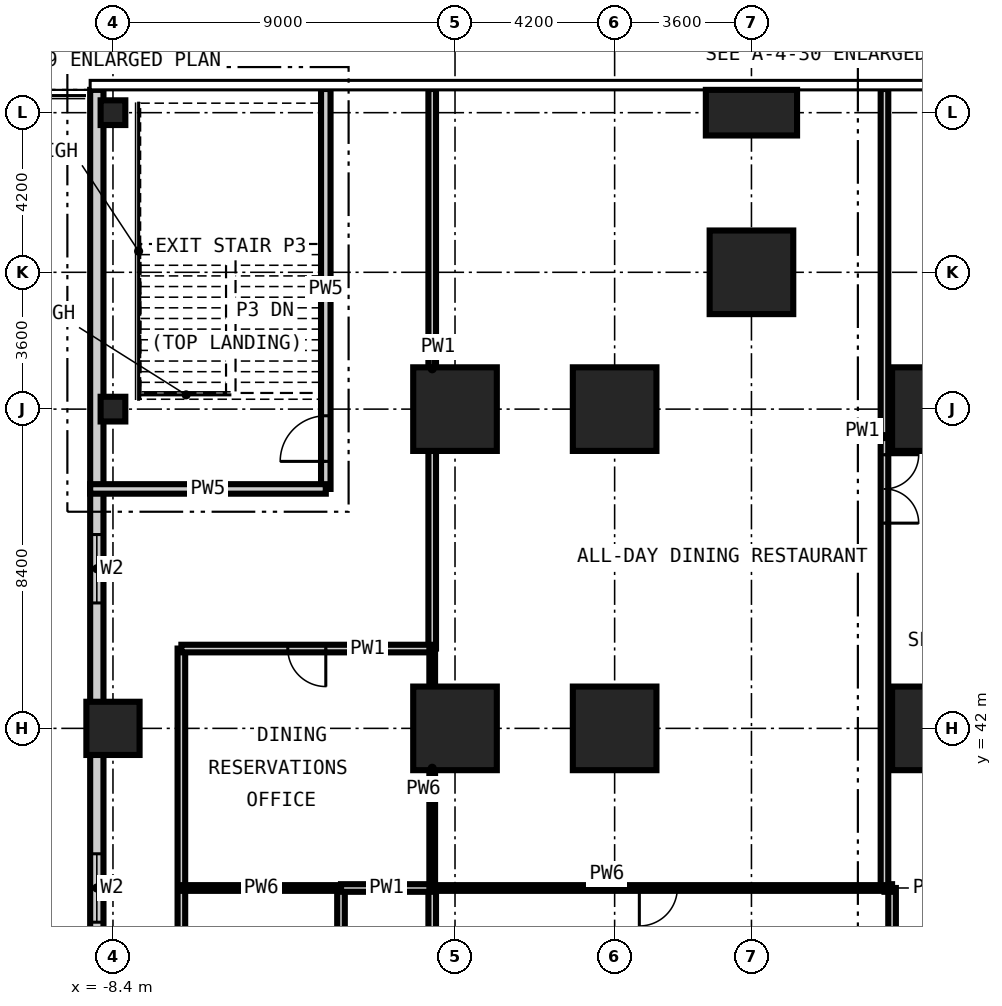
"""IFC4 building model, lengths in metres.
Left out: names, types, materials, properties, quantities, classifications, styles, units other than length and angle.
Written with IfcOpenShell. Run it as: python <this file> out.ifc"""

import sys

from ifc_helpers import new_model, si_unit, direction, frame, frame_2d, origin, origin_2d, place, context, subcontext, project, spatial, rectangle, extrude, element, fill, save


model = new_model("IFC4")
c1 = context("Model", 3, precision=1e-05, world=origin(), true_north=direction((0.0, 1.0)))
c2 = subcontext(c1, "Body", "Model", "MODEL_VIEW")
j1 = project(units=[si_unit("LENGTHUNIT", "METRE"), si_unit("PLANEANGLEUNIT", "RADIAN")], contexts=[c1])
p1 = place(None, origin())
s1 = spatial("IfcSite", under=j1, at=p1, CompositionType="ELEMENT")
p2 = place(p1, origin())
s2 = spatial("IfcBuilding", under=s1, at=p2, CompositionType="ELEMENT")
p3 = place(p2, frame((0.0, 0.0, 17.0)))
s3 = spatial("IfcBuildingStorey", under=s2, at=p3, CompositionType="ELEMENT", Elevation=17.0)
for number, where, z_axis, x_axis in (
    (1, (0.6, 42.0, -0.3), (0.0, 0.0, 1.0), (1.0, 0.0, 0.0)),
    (2, (0.6, 50.4, -0.3), (0.0, 0.0, 1.0), (1.0, 0.0, 0.0)),
    (3, (4.8, 42.0, -0.3), (0.0, 0.0, 1.0), (1.0, 0.0, 0.0)),
    (4, (4.8, 50.4, -0.3), (0.0, 0.0, 1.0), (1.0, 0.0, 0.0)),
    (5, (8.4, 54.0, -0.3), (0.0, 0.0, 1.0), (1.0, 0.0, 0.0)),
):
    element("IfcColumn", number, at=place(p3, frame(where, z_axis=z_axis, x_axis=x_axis)), inside=s3, PredefinedType="COLUMN", context=c2, shape_type="SweptSolid", body=[
        extrude(rectangle(XDim=2.2, YDim=2.2, at=origin_2d()), origin(), (0.0, 0.0, 1.0), 4.95),
    ])
p4 = place(p3, frame((8.4, 58.2, -0.3), z_axis=(0.0, 0.0, 1.0), x_axis=(1.0, 0.0, 0.0)))
e6 = element("IfcColumn", 6, at=p4, inside=s3, PredefinedType="COLUMN", context=c2, shape_type="SweptSolid", body=[
    extrude(rectangle(XDim=2.4, YDim=1.2, at=origin_2d()), origin(), (0.0, 0.0, 1.0), 4.95),
])
for number, where, z_axis, x_axis in (
    (7, (13.2, 42.0, -0.3), (0.0, 0.0, 1.0), (1.0, 0.0, 0.0)),
    (8, (13.2, 50.4, -0.3), (0.0, 0.0, 1.0), (1.0, 0.0, 0.0)),
):
    element("IfcColumn", number, at=place(p3, frame(where, z_axis=z_axis, x_axis=x_axis)), inside=s3, PredefinedType="COLUMN", context=c2, shape_type="SweptSolid", body=[
        extrude(rectangle(XDim=2.2, YDim=2.2, at=origin_2d()), origin(), (0.0, 0.0, 1.0), 4.95),
    ])
p5 = place(p3, frame((-8.4, 42.0, -0.3), z_axis=(0.0, 0.0, 1.0), x_axis=(1.0, 0.0, 0.0)))
e9 = element("IfcColumn", 9, at=p5, inside=s3, PredefinedType="COLUMN", context=c2, shape_type="SweptSolid", body=[
    extrude(rectangle(XDim=1.4, YDim=1.4, at=origin_2d()), origin(), (0.0, 0.0, 1.0), 4.95),
])
for number, where, z_axis, x_axis in (
    (10, (-8.4, 50.4, -0.3), (0.0, 0.0, 1.0), (1.0, 0.0, 0.0)),
    (11, (-8.4, 58.2, -0.3), (0.0, 0.0, 1.0), (1.0, 0.0, 0.0)),
):
    element("IfcColumn", number, at=place(p3, frame(where, z_axis=z_axis, x_axis=x_axis)), inside=s3, PredefinedType="COLUMN", context=c2, shape_type="SweptSolid", body=[
        extrude(rectangle(XDim=0.65, YDim=0.65, at=origin_2d()), origin(), (0.0, 0.0, 1.0), 4.95),
    ])
p6 = place(p3, frame((-8.825, 58.8, 0.0), z_axis=(0.0, 0.0, 1.0), x_axis=(0.0, -1.0, 0.0)))
e12 = element("IfcWall", 12, at=p6, inside=s3, PredefinedType="SOLIDWALL", context=c2, shape_type="SweptSolid", body=[
    extrude(rectangle(XDim=58.8, YDim=0.35, at=frame_2d((29.4, 0.0))), origin(), (0.0, 0.0, 1.0), 4.65),
])
p7 = place(p6, frame((28.9, 0.0, 0.0)))
e13 = element("IfcOpeningElement", 13, at=p7, cuts=e12, PredefinedType="OPENING", context=c2, shape_type="SweptSolid", body=[
    extrude(rectangle(XDim=1.0, YDim=2.4, at=frame_2d((0.5, 1.2))), frame((0.0, 0.185, 0.0), z_axis=(0.0, -1.0, 0.0), x_axis=(1.0, 0.0, 0.0)), (0.0, 0.0, 1.0), 0.37),
])
p8 = place(p6, frame((45.3, 0.0, 0.6)))
e14 = element("IfcOpeningElement", 14, at=p8, cuts=e12, PredefinedType="OPENING", context=c2, shape_type="SweptSolid", body=[
    extrude(rectangle(XDim=1.8, YDim=2.1, at=frame_2d((0.9, 1.05))), frame((0.0, 0.185, 0.0), z_axis=(0.0, -1.0, 0.0), x_axis=(1.0, 0.0, 0.0)), (0.0, 0.0, 1.0), 0.37),
])
p9 = place(p6, frame((36.9, 0.0, 0.6)))
e15 = element("IfcOpeningElement", 15, at=p9, cuts=e12, PredefinedType="OPENING", context=c2, shape_type="SweptSolid", body=[
    extrude(rectangle(XDim=1.8, YDim=2.1, at=frame_2d((0.9, 1.05))), frame((0.0, 0.185, 0.0), z_axis=(0.0, -1.0, 0.0), x_axis=(1.0, 0.0, 0.0)), (0.0, 0.0, 1.0), 0.37),
])
p10 = place(p6, frame((20.1, 0.0, 0.6)))
e16 = element("IfcOpeningElement", 16, at=p10, cuts=e12, PredefinedType="OPENING", context=c2, shape_type="SweptSolid", body=[
    extrude(rectangle(XDim=1.8, YDim=2.1, at=frame_2d((0.9, 1.05))), frame((0.0, 0.185, 0.0), z_axis=(0.0, -1.0, 0.0), x_axis=(1.0, 0.0, 0.0)), (0.0, 0.0, 1.0), 0.37),
])
p11 = place(p6, frame((11.7, 0.0, 0.6)))
e17 = element("IfcOpeningElement", 17, at=p11, cuts=e12, PredefinedType="OPENING", context=c2, shape_type="SweptSolid", body=[
    extrude(rectangle(XDim=1.8, YDim=2.1, at=frame_2d((0.9, 1.05))), frame((0.0, 0.185, 0.0), z_axis=(0.0, -1.0, 0.0), x_axis=(1.0, 0.0, 0.0)), (0.0, 0.0, 1.0), 0.37),
])
p12 = place(p3, frame((-6.6, 14.7, 0.0), z_axis=(0.0, 0.0, 1.0), x_axis=(0.0, 1.0, 0.0)))
e18 = element("IfcWall", 18, at=p12, inside=s3, PredefinedType="PARTITIONING", context=c2, shape_type="SweptSolid", body=[
    extrude(rectangle(XDim=29.4, YDim=0.2, at=frame_2d((14.7, 0.0))), origin(), (0.0, 0.0, 1.0), 4.65),
])
p13 = place(p3, frame((-2.4, 14.7, 0.0), z_axis=(0.0, 0.0, 1.0), x_axis=(0.0, 1.0, 0.0)))
e19 = element("IfcWall", 19, at=p13, inside=s3, PredefinedType="PARTITIONING", context=c2, shape_type="SweptSolid", body=[
    extrude(rectangle(XDim=23.1, YDim=0.2, at=frame_2d((11.55, 0.0))), origin(), (0.0, 0.0, 1.0), 4.65),
])
p14 = place(p13, frame((5.275, 0.0, 0.0)))
e20 = element("IfcOpeningElement", 20, at=p14, cuts=e19, PredefinedType="OPENING", context=c2, shape_type="SweptSolid", body=[
    extrude(rectangle(XDim=1.0, YDim=2.1, at=frame_2d((0.5, 1.05))), frame((0.0, 0.11, 0.0), z_axis=(0.0, -1.0, 0.0), x_axis=(1.0, 0.0, 0.0)), (0.0, 0.0, 1.0), 0.22),
])
p15 = place(p13, frame((16.825, 0.0, 0.0)))
e21 = element("IfcOpeningElement", 21, at=p15, cuts=e19, PredefinedType="OPENING", context=c2, shape_type="SweptSolid", body=[
    extrude(rectangle(XDim=1.0, YDim=2.1, at=frame_2d((0.5, 1.05))), frame((0.0, 0.11, 0.0), z_axis=(0.0, -1.0, 0.0), x_axis=(1.0, 0.0, 0.0)), (0.0, 0.0, 1.0), 0.22),
])
p16 = place(p3, frame((0.0, 14.7, 0.0), z_axis=(0.0, 0.0, 1.0), x_axis=(0.0, 1.0, 0.0)))
e22 = element("IfcWall", 22, at=p16, inside=s3, PredefinedType="PARTITIONING", context=c2, shape_type="SweptSolid", body=[
    extrude(rectangle(XDim=23.1, YDim=0.2, at=frame_2d((11.55, 0.0))), origin(), (0.0, 0.0, 1.0), 4.65),
])
p17 = place(p16, frame((14.2, 0.0, 0.0)))
e23 = element("IfcOpeningElement", 23, at=p17, cuts=e22, PredefinedType="OPENING", context=c2, shape_type="SweptSolid", body=[
    extrude(rectangle(XDim=1.0, YDim=2.1, at=frame_2d((0.5, 1.05))), frame((0.0, 0.11, 0.0), z_axis=(0.0, -1.0, 0.0), x_axis=(1.0, 0.0, 0.0)), (0.0, 0.0, 1.0), 0.22),
])
p18 = place(p16, frame((3.35, 0.0, 0.0)))
e24 = element("IfcOpeningElement", 24, at=p18, cuts=e22, PredefinedType="OPENING", context=c2, shape_type="SweptSolid", body=[
    extrude(rectangle(XDim=1.0, YDim=2.1, at=frame_2d((0.5, 1.05))), frame((0.0, 0.11, 0.0), z_axis=(0.0, -1.0, 0.0), x_axis=(1.0, 0.0, 0.0)), (0.0, 0.0, 1.0), 0.22),
])
p19 = place(p3, frame((0.0, 44.1, 0.0), z_axis=(0.0, 0.0, 1.0), x_axis=(0.0, 1.0, 0.0)))
e25 = element("IfcWall", 25, at=p19, inside=s3, PredefinedType="PARTITIONING", context=c2, shape_type="SweptSolid", body=[
    extrude(rectangle(XDim=14.723, YDim=0.2, at=frame_2d((7.361, 0.0))), origin(), (0.0, 0.0, 1.0), 4.65),
])
p20 = place(p3, frame((12.1, 14.7, 0.0), z_axis=(0.0, 0.0, 1.0), x_axis=(0.0, 1.0, 0.0)))
e26 = element("IfcWall", 26, at=p20, inside=s3, PredefinedType="PARTITIONING", context=c2, shape_type="SweptSolid", body=[
    extrude(rectangle(XDim=23.1, YDim=0.2, at=frame_2d((11.55, 0.0))), origin(), (0.0, 0.0, 1.0), 4.65),
])
p21 = place(p3, frame((-2.4, 37.8, 0.0), z_axis=(0.0, 0.0, 1.0), x_axis=(1.0, 0.0, 0.0)))
e27 = element("IfcWall", 27, at=p21, inside=s3, PredefinedType="PARTITIONING", context=c2, shape_type="SweptSolid", body=[
    extrude(rectangle(XDim=2.4, YDim=0.2, at=frame_2d((1.2, 0.0))), origin(), (0.0, 0.0, 1.0), 4.65),
])
p22 = place(p3, frame((11.9, 37.8, 0.0), z_axis=(0.0, 0.0, 1.0), x_axis=(1.0, 0.0, 0.0)))
e28 = element("IfcWall", 28, at=p22, inside=s3, PredefinedType="PARTITIONING", context=c2, shape_type="SweptSolid", body=[
    extrude(rectangle(XDim=0.2, YDim=0.2, at=frame_2d((0.1, 0.0))), origin(), (0.0, 0.0, 1.0), 4.65),
])
p23 = place(p3, frame((-6.6, 44.1, 0.0), z_axis=(0.0, 0.0, 1.0), x_axis=(1.0, 0.0, 0.0)))
e29 = element("IfcWall", 29, at=p23, inside=s3, PredefinedType="PARTITIONING", context=c2, shape_type="SweptSolid", body=[
    extrude(rectangle(XDim=6.6, YDim=0.2, at=frame_2d((3.3, 0.0))), origin(), (0.0, 0.0, 1.0), 4.65),
])
p24 = place(p23, frame((2.8, 0.0, 0.0)))
e30 = element("IfcOpeningElement", 30, at=p24, cuts=e29, PredefinedType="OPENING", context=c2, shape_type="SweptSolid", body=[
    extrude(rectangle(XDim=1.0, YDim=2.1, at=frame_2d((0.5, 1.05))), frame((0.0, 0.11, 0.0), z_axis=(0.0, -1.0, 0.0), x_axis=(1.0, 0.0, 0.0)), (0.0, 0.0, 1.0), 0.22),
])
p25 = place(p3, frame((11.9, 58.823, 0.0), z_axis=(0.0, 0.0, 1.0), x_axis=(0.0, -1.0, 0.0)))
e31 = element("IfcWall", 31, at=p25, inside=s3, PredefinedType="PARTITIONING", context=c2, shape_type="SweptSolid", body=[
    extrude(rectangle(XDim=21.023, YDim=0.2, at=frame_2d((10.511, 0.0))), origin(), (0.0, 0.0, 1.0), 4.65),
])
p26 = place(p25, frame((9.623, 0.0, 0.0)))
e32 = element("IfcOpeningElement", 32, at=p26, cuts=e31, PredefinedType="OPENING", context=c2, shape_type="SweptSolid", body=[
    extrude(rectangle(XDim=1.8, YDim=2.4, at=frame_2d((0.9, 1.2))), frame((0.0, 0.11, 0.0), z_axis=(0.0, -1.0, 0.0), x_axis=(1.0, 0.0, 0.0)), (0.0, 0.0, 1.0), 0.22),
])
p27 = place(p3, frame((0.0, 37.8, 0.0), z_axis=(0.0, 0.0, 1.0), x_axis=(0.0, 1.0, 0.0)))
e33 = element("IfcWall", 33, at=p27, inside=s3, PredefinedType="PARTITIONING", context=c2, shape_type="SweptSolid", body=[
    extrude(rectangle(XDim=6.3, YDim=0.15, at=frame_2d((3.15, 0.0))), origin(), (0.0, 0.0, 1.0), 4.65),
])
p28 = place(p3, frame((-6.6, 37.8, 0.0), z_axis=(0.0, 0.0, 1.0), x_axis=(1.0, 0.0, 0.0)))
e34 = element("IfcWall", 34, at=p28, inside=s3, PredefinedType="PARTITIONING", context=c2, shape_type="SweptSolid", body=[
    extrude(rectangle(XDim=4.2, YDim=0.15, at=frame_2d((2.1, 0.0))), origin(), (0.0, 0.0, 1.0), 4.65),
])
p29 = place(p3, frame((0.0, 37.8, 0.0), z_axis=(0.0, 0.0, 1.0), x_axis=(1.0, 0.0, 0.0)))
e35 = element("IfcWall", 35, at=p29, inside=s3, PredefinedType="PARTITIONING", context=c2, shape_type="SweptSolid", body=[
    extrude(rectangle(XDim=11.9, YDim=0.15, at=frame_2d((5.95, 0.0))), origin(), (0.0, 0.0, 1.0), 4.65),
])
p30 = place(p29, frame((5.45, 0.0, 0.0)))
e36 = element("IfcOpeningElement", 36, at=p30, cuts=e35, PredefinedType="OPENING", context=c2, shape_type="SweptSolid", body=[
    extrude(rectangle(XDim=1.0, YDim=2.1, at=frame_2d((0.5, 1.05))), frame((0.0, 0.085, 0.0), z_axis=(0.0, -1.0, 0.0), x_axis=(1.0, 0.0, 0.0)), (0.0, 0.0, 1.0), 0.17),
])
p31 = place(p3, frame((-2.8, 48.3, 0.0), z_axis=(0.0, 0.0, 1.0), x_axis=(0.0, 1.0, 0.0)))
e37 = element("IfcWall", 37, at=p31, inside=s3, PredefinedType="PARTITIONING", context=c2, shape_type="SweptSolid", body=[
    extrude(rectangle(XDim=10.523, YDim=0.25, at=frame_2d((5.261, 0.0))), origin(), (0.0, 0.0, 1.0), 4.65),
])
p32 = place(p31, frame((0.725, 0.0, 0.0)))
e38 = element("IfcOpeningElement", 38, at=p32, cuts=e37, PredefinedType="OPENING", context=c2, shape_type="SweptSolid", body=[
    extrude(rectangle(XDim=1.2, YDim=2.2, at=frame_2d((0.6, 1.1))), frame((0.0, 0.135, 0.0), z_axis=(0.0, -1.0, 0.0), x_axis=(1.0, 0.0, 0.0)), (0.0, 0.0, 1.0), 0.27),
])
p33 = place(p3, frame((-9.0, 48.3, 0.0), z_axis=(0.0, 0.0, 1.0), x_axis=(1.0, 0.0, 0.0)))
e39 = element("IfcWall", 39, at=p33, inside=s3, PredefinedType="PARTITIONING", context=c2, shape_type="SweptSolid", body=[
    extrude(rectangle(XDim=6.2, YDim=0.25, at=frame_2d((3.1, 0.0))), origin(), (0.0, 0.0, 1.0), 4.65),
])
p34 = place(p10, origin())
e40 = element("IfcWindow", 40, at=p34, inside=s3, PartitioningType="SINGLE_PANEL", PredefinedType="WINDOW", context=c2, shape_type="SweptSolid", body=[
    extrude(rectangle(XDim=1.8, YDim=2.1, at=frame_2d((0.9, 1.05))), frame((0.0, 0.03, 0.0), z_axis=(0.0, -1.0, 0.0), x_axis=(1.0, 0.0, 0.0)), (0.0, 0.0, 1.0), 0.06),
])
fill(e16, e40)
p35 = place(p11, origin())
e41 = element("IfcWindow", 41, at=p35, inside=s3, PartitioningType="SINGLE_PANEL", PredefinedType="WINDOW", context=c2, shape_type="SweptSolid", body=[
    extrude(rectangle(XDim=1.8, YDim=2.1, at=frame_2d((0.9, 1.05))), frame((0.0, 0.03, 0.0), z_axis=(0.0, -1.0, 0.0), x_axis=(1.0, 0.0, 0.0)), (0.0, 0.0, 1.0), 0.06),
])
fill(e17, e41)
p36 = place(p32, origin())
e42 = element("IfcDoor", 42, at=p36, inside=s3, OperationType="SINGLE_SWING_LEFT", PredefinedType="DOOR", context=c2, shape_type="SweptSolid", body=[
    extrude(rectangle(XDim=1.2, YDim=2.2, at=frame_2d((0.6, 1.1))), frame((0.0, 0.025, 0.0), z_axis=(0.0, -1.0, 0.0), x_axis=(1.0, 0.0, 0.0)), (0.0, 0.0, 1.0), 0.05),
])
fill(e38, e42)
p37 = place(p26, origin())
e43 = element("IfcDoor", 43, at=p37, inside=s3, OperationType="DOUBLE_DOOR_DOUBLE_SWING", PredefinedType="DOOR", context=c2, shape_type="SweptSolid", body=[
    extrude(rectangle(XDim=1.8, YDim=2.4, at=frame_2d((0.9, 1.2))), frame((0.0, 0.025, 0.0), z_axis=(0.0, -1.0, 0.0), x_axis=(1.0, 0.0, 0.0)), (0.0, 0.0, 1.0), 0.05),
])
fill(e32, e43)
p38 = place(p30, frame((1.0, 0.0, 0.0), z_axis=(0.0, 0.0, 1.0), x_axis=(-1.0, 0.0, 0.0)))
e44 = element("IfcDoor", 44, at=p38, inside=s3, OperationType="SINGLE_SWING_RIGHT", PredefinedType="DOOR", context=c2, shape_type="SweptSolid", body=[
    extrude(rectangle(XDim=1.0, YDim=2.1, at=frame_2d((0.5, 1.05))), frame((0.0, 0.025, 0.0), z_axis=(0.0, -1.0, 0.0), x_axis=(1.0, 0.0, 0.0)), (0.0, 0.0, 1.0), 0.05),
])
fill(e36, e44)
p39 = place(p24, frame((1.0, 0.0, 0.0), z_axis=(0.0, 0.0, 1.0), x_axis=(-1.0, 0.0, 0.0)))
e45 = element("IfcDoor", 45, at=p39, inside=s3, OperationType="SINGLE_SWING_LEFT", PredefinedType="DOOR", context=c2, shape_type="SweptSolid", body=[
    extrude(rectangle(XDim=1.0, YDim=2.1, at=frame_2d((0.5, 1.05))), frame((0.0, 0.025, 0.0), z_axis=(0.0, -1.0, 0.0), x_axis=(1.0, 0.0, 0.0)), (0.0, 0.0, 1.0), 0.05),
])
fill(e30, e45)
save(model, sys.argv[1])
